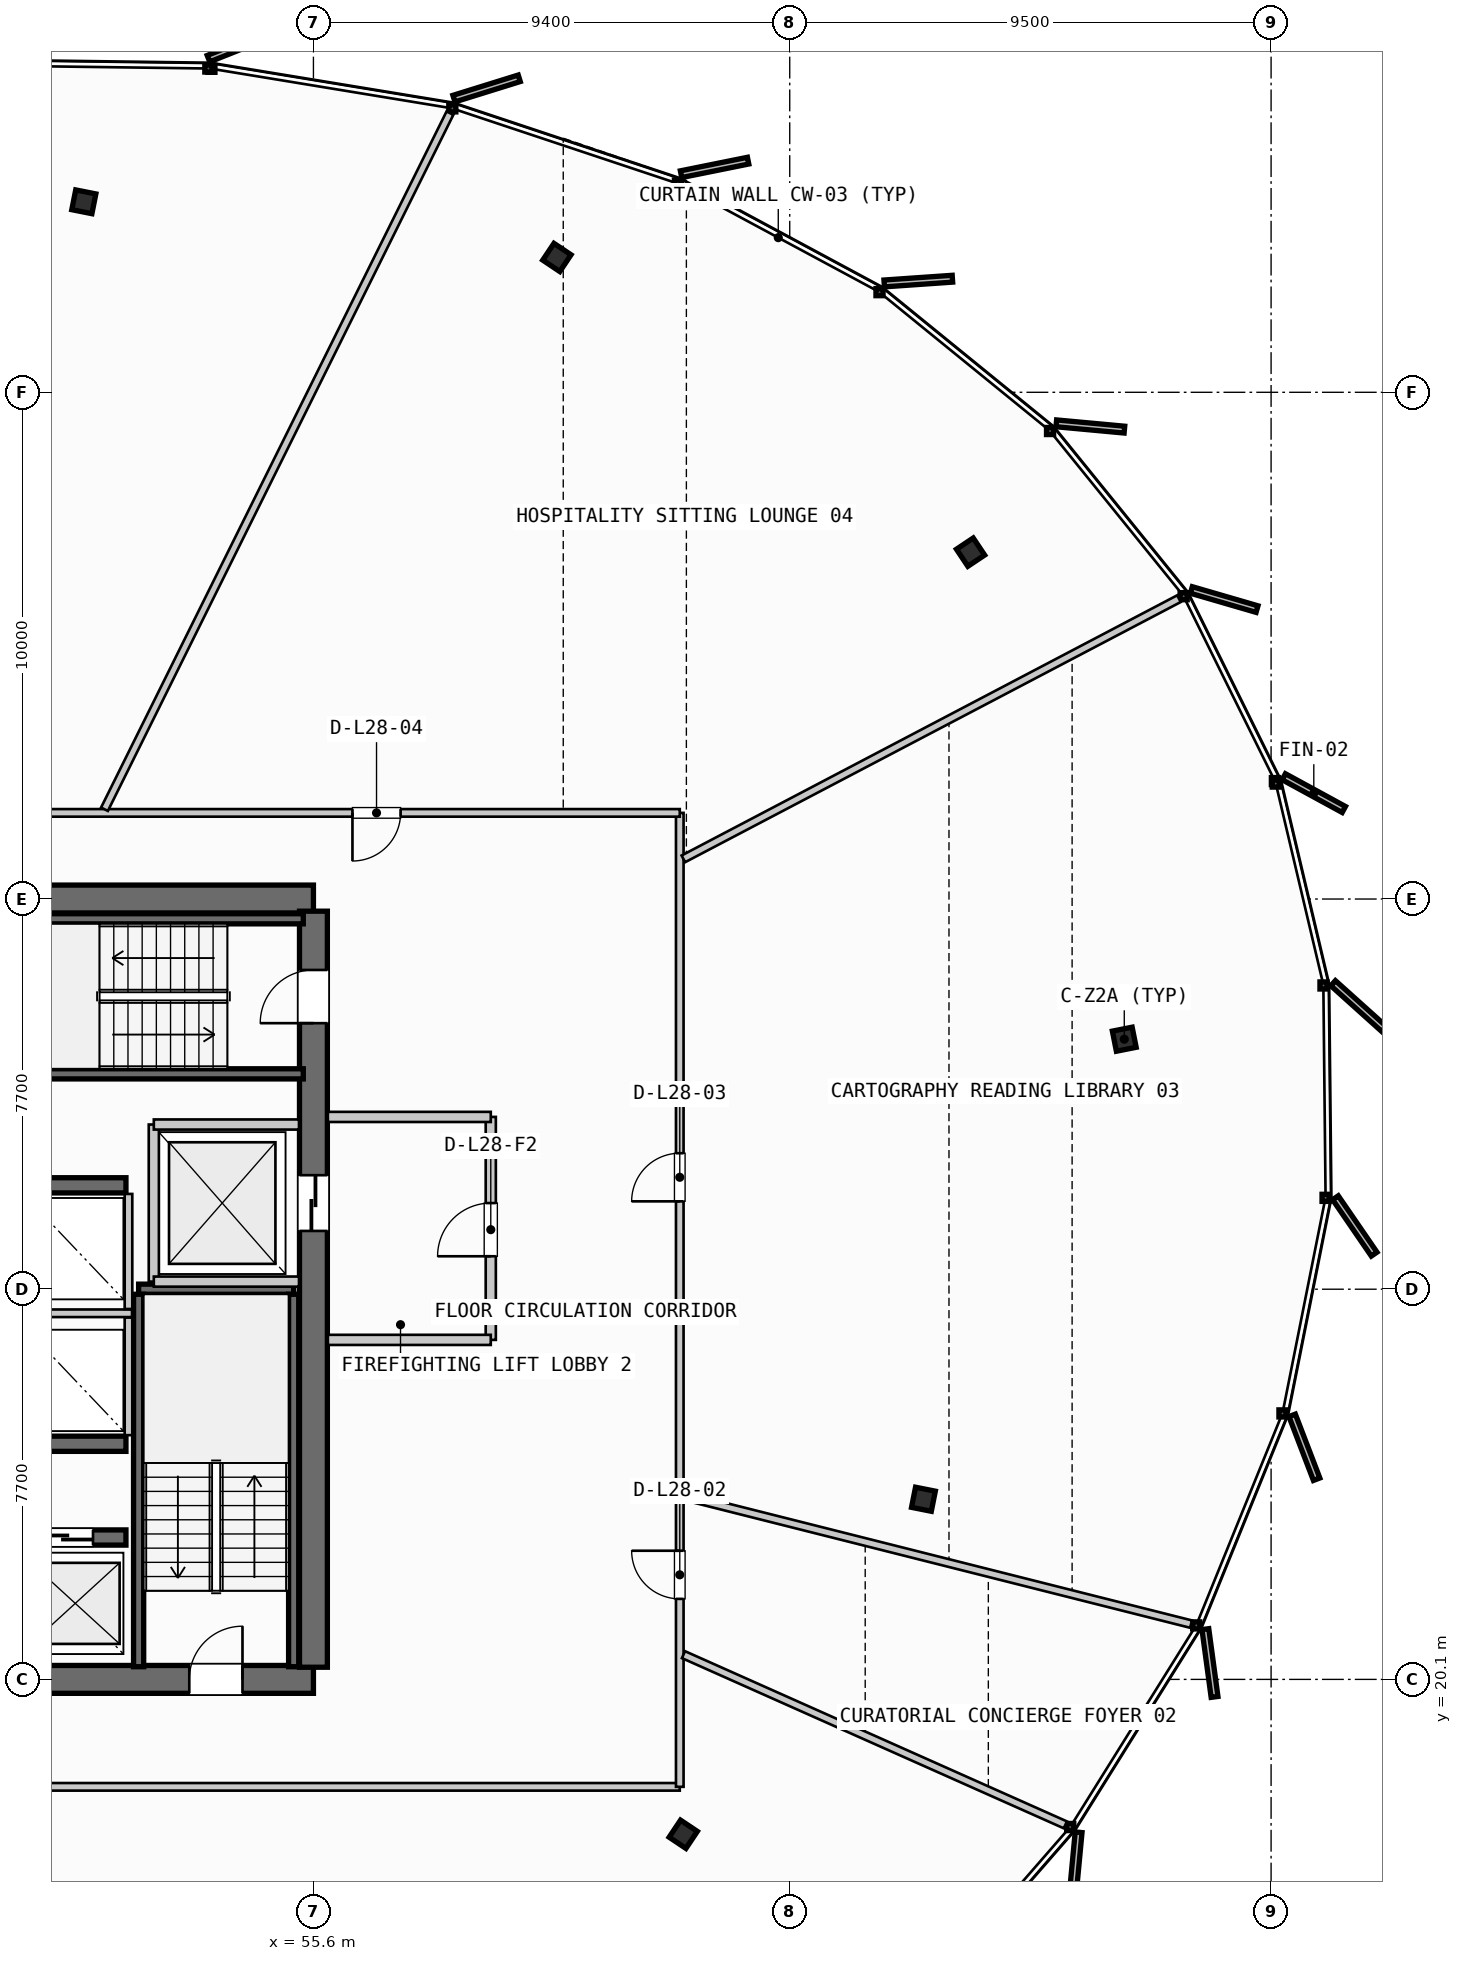
"""IFC4 building model, lengths in metres.
Left out: names, types, materials, properties, quantities, classifications, styles, units other than length and angle.
Written with IfcOpenShell. Run it as: python <this file> out.ifc"""

import sys

from ifc_helpers import new_model, si_unit, direction, frame, frame_2d, origin, origin_2d, place, context, subcontext, project, spatial, rectangle, i_section, extrude, source, transform, mapped, element, fill, save


model = new_model("IFC4")
c1 = context("Model", 3, precision=1e-05, world=origin(), true_north=direction((0.0, 1.0)))
c2 = subcontext(c1, "Body", "Model", "MODEL_VIEW")
j1 = project(units=[si_unit("LENGTHUNIT", "METRE"), si_unit("PLANEANGLEUNIT", "RADIAN")], contexts=[c1])
p1 = place(None, origin())
s1 = spatial("IfcSite", under=j1, at=p1, CompositionType="ELEMENT")
p2 = place(p1, origin())
s2 = spatial("IfcBuilding", under=s1, at=p2, CompositionType="ELEMENT")
p3 = place(p2, frame((0.0, 0.0, 114.4)))
s3 = spatial("IfcBuildingStorey", under=s2, at=p3, CompositionType="ELEMENT", Elevation=114.4)
p4 = place(p3, frame((38.0, 20.1, 0.0), z_axis=(0.0, 0.0, 1.0), x_axis=(1.0, 0.0, 0.0)))
e1 = element("IfcWall", 1, at=p4, inside=s3, PredefinedType="SHEAR", context=c2, shape_type="SweptSolid", body=[
    extrude(rectangle(XDim=17.6, YDim=0.55, at=frame_2d((8.8, 0.0))), origin(), (0.0, 0.0, 1.0), 3.35),
])
p5 = place(p4, frame((1.4, 0.0, 0.0)))
e2 = element("IfcOpeningElement", 2, at=p5, cuts=e1, PredefinedType="OPENING", context=c2, shape_type="SweptSolid", body=[
    extrude(rectangle(XDim=1.05, YDim=2.15, at=frame_2d((0.525, 1.075))), frame((0.0, 0.285, 0.0), z_axis=(0.0, -1.0, 0.0), x_axis=(1.0, 0.0, 0.0)), (0.0, 0.0, 1.0), 0.57),
])
p6 = place(p4, frame((15.15, 0.0, 0.0)))
e3 = element("IfcOpeningElement", 3, at=p6, cuts=e1, PredefinedType="OPENING", context=c2, shape_type="SweptSolid", body=[
    extrude(rectangle(XDim=1.05, YDim=2.15, at=frame_2d((0.525, 1.075))), frame((0.0, 0.285, 0.0), z_axis=(0.0, -1.0, 0.0), x_axis=(1.0, 0.0, 0.0)), (0.0, 0.0, 1.0), 0.57),
])
p7 = place(p3, frame((55.6, 35.5, 0.0), z_axis=(0.0, 0.0, 1.0), x_axis=(-1.0, 0.0, 0.0)))
e4 = element("IfcWall", 4, at=p7, inside=s3, PredefinedType="SHEAR", context=c2, shape_type="SweptSolid", body=[
    extrude(rectangle(XDim=17.6, YDim=0.55, at=frame_2d((8.8, 0.0))), origin(), (0.0, 0.0, 1.0), 3.35),
])
p8 = place(p7, frame((8.05, 0.0, 0.0)))
e5 = element("IfcOpeningElement", 5, at=p8, cuts=e4, PredefinedType="OPENING", context=c2, shape_type="SweptSolid", body=[
    extrude(rectangle(XDim=1.5, YDim=2.2, at=frame_2d((0.75, 1.1))), frame((0.0, 0.285, 0.0), z_axis=(0.0, -1.0, 0.0), x_axis=(1.0, 0.0, 0.0)), (0.0, 0.0, 1.0), 0.57),
])
p9 = place(p7, frame((14.95, 0.0, 0.0)))
e6 = element("IfcOpeningElement", 6, at=p9, cuts=e4, PredefinedType="OPENING", context=c2, shape_type="SweptSolid", body=[
    extrude(rectangle(XDim=1.4, YDim=2.3, at=frame_2d((0.7, 1.15))), frame((0.0, 0.285, 0.0), z_axis=(0.0, -1.0, 0.0), x_axis=(1.0, 0.0, 0.0)), (0.0, 0.0, 1.0), 0.57),
])
p10 = place(p7, frame((12.6, 0.0, 0.0)))
e7 = element("IfcOpeningElement", 7, at=p10, cuts=e4, PredefinedType="OPENING", context=c2, shape_type="SweptSolid", body=[
    extrude(rectangle(XDim=0.95, YDim=2.15, at=frame_2d((0.475, 1.075))), frame((0.0, 0.285, 0.0), z_axis=(0.0, -1.0, 0.0), x_axis=(1.0, 0.0, 0.0)), (0.0, 0.0, 1.0), 0.57),
])
p11 = place(p7, frame((10.45, 0.0, 0.0)))
e8 = element("IfcOpeningElement", 8, at=p11, cuts=e4, PredefinedType="OPENING", context=c2, shape_type="SweptSolid", body=[
    extrude(rectangle(XDim=0.95, YDim=2.15, at=frame_2d((0.475, 1.075))), frame((0.0, 0.285, 0.0), z_axis=(0.0, -1.0, 0.0), x_axis=(1.0, 0.0, 0.0)), (0.0, 0.0, 1.0), 0.57),
])
p12 = place(p3, frame((55.6, 20.34, 0.0), z_axis=(0.0, 0.0, 1.0), x_axis=(0.0, 1.0, 0.0)))
e9 = element("IfcWall", 9, at=p12, inside=s3, PredefinedType="SHEAR", context=c2, shape_type="SweptSolid", body=[
    extrude(rectangle(XDim=14.92, YDim=0.55, at=frame_2d((7.46, 0.0))), origin(), (0.0, 0.0, 1.0), 3.35),
])
p13 = place(p12, frame((12.71, 0.0, 0.0)))
e10 = element("IfcOpeningElement", 10, at=p13, cuts=e9, PredefinedType="OPENING", context=c2, shape_type="SweptSolid", body=[
    extrude(rectangle(XDim=1.05, YDim=2.15, at=frame_2d((0.525, 1.075))), frame((0.0, 0.285, 0.0), z_axis=(0.0, -1.0, 0.0), x_axis=(1.0, 0.0, 0.0)), (0.0, 0.0, 1.0), 0.57),
])
p14 = place(p12, frame((8.61, 0.0, 0.0)))
e11 = element("IfcOpeningElement", 11, at=p14, cuts=e9, PredefinedType="OPENING", context=c2, shape_type="SweptSolid", body=[
    extrude(rectangle(XDim=1.1, YDim=2.2, at=frame_2d((0.55, 1.1))), frame((0.0, 0.285, 0.0), z_axis=(0.0, -1.0, 0.0), x_axis=(1.0, 0.0, 0.0)), (0.0, 0.0, 1.0), 0.57),
])
p15 = place(p3, frame((47.65, 22.9, 0.0), z_axis=(0.0, 0.0, 1.0), x_axis=(1.0, 0.0, 0.0)))
e12 = element("IfcWall", 12, at=p15, inside=s3, PredefinedType="SHEAR", context=c2, shape_type="SweptSolid", body=[
    extrude(rectangle(XDim=4.25, YDim=0.3, at=frame_2d((2.125, 0.0))), origin(), (0.0, 0.0, 1.0), 3.35),
])
p16 = place(p15, frame((0.45, 0.0, 0.0)))
e13 = element("IfcOpeningElement", 13, at=p16, cuts=e12, PredefinedType="OPENING", context=c2, shape_type="SweptSolid", body=[
    extrude(rectangle(XDim=1.1, YDim=2.2, at=frame_2d((0.55, 1.1))), frame((0.0, 0.16, 0.0), z_axis=(0.0, -1.0, 0.0), x_axis=(1.0, 0.0, 0.0)), (0.0, 0.0, 1.0), 0.32),
])
p17 = place(p15, frame((2.5, 0.0, 0.0)))
e14 = element("IfcOpeningElement", 14, at=p17, cuts=e12, PredefinedType="OPENING", context=c2, shape_type="SweptSolid", body=[
    extrude(rectangle(XDim=1.1, YDim=2.2, at=frame_2d((0.55, 1.1))), frame((0.0, 0.16, 0.0), z_axis=(0.0, -1.0, 0.0), x_axis=(1.0, 0.0, 0.0)), (0.0, 0.0, 1.0), 0.32),
])
for number, where, z_axis, x_axis in (
    (15, (47.65, 24.75, 0.0), (0.0, 0.0, 1.0), (1.0, 0.0, 0.0)),
    (16, (47.65, 29.85, 0.0), (0.0, 0.0, 1.0), (1.0, 0.0, 0.0)),
):
    element("IfcWall", number, at=place(p3, frame(where, z_axis=z_axis, x_axis=x_axis)), inside=s3, PredefinedType="SHEAR", context=c2, shape_type="SweptSolid", body=[
        extrude(rectangle(XDim=4.25, YDim=0.3, at=frame_2d((2.125, 0.0))), origin(), (0.0, 0.0, 1.0), 3.35),
    ])
m1 = source(origin(), c2, "Body", "SweptSolid", [
    extrude(i_section(OverallWidth=0.405, OverallDepth=0.398, WebThickness=0.035, FlangeThickness=0.056, FilletRadius=0.015, at=origin_2d()), origin(), (0.0, 0.0, 1.0), 3.35),
])
for number, where, z_axis, x_axis in (
    (17, (71.603, 32.733, 0.0), (0.0, 0.0, 1.0), (0.981, 0.195, 0.0)),
    (18, (68.569, 42.345, 0.0), (0.0, 0.0, 1.0), (0.831, 0.556, 0.0)),
    (19, (60.405, 48.161, 0.0), (0.0, 0.0, 1.0), (0.556, 0.831, 0.0)),
    (20, (51.069, 49.259, 0.0), (0.0, 0.0, 1.0), (0.195, 0.981, 0.0)),
    (21, (62.899, 17.043, 0.0), (0.0, 0.0, 1.0), (0.831, -0.556, 0.0)),
    (22, (67.639, 23.655, 0.0), (0.0, 0.0, 1.0), (0.981, -0.195, 0.0)),
):
    element("IfcColumn", number, at=place(p3, frame(where, z_axis=z_axis, x_axis=x_axis)), inside=s3, PredefinedType="COLUMN", context=c2, shape_type="MappedRepresentation", body=[
        mapped(m1, transform((0.0, 0.0, 0.0), scale=1.0)),
    ])
p18 = place(p3, frame((52.15, 27.8, 0.0), z_axis=(0.0, 0.0, 1.0), x_axis=(1.0, 0.0, 0.0)))
e23 = element("IfcWall", 23, at=p18, inside=s3, PredefinedType="SHEAR", context=c2, shape_type="SweptSolid", body=[
    extrude(rectangle(XDim=3.06, YDim=0.2, at=frame_2d((1.53, 0.0))), origin(), (0.0, 0.0, 1.0), 3.35),
])
for number, where, z_axis, x_axis in (
    (24, (55.21, 27.7, 0.0), (0.0, 0.0, 1.0), (0.0, -1.0, 0.0)),
    (25, (52.15, 20.35, 0.0), (0.0, 0.0, 1.0), (0.0, 1.0, 0.0)),
    (26, (48.05, 35.11, 0.0), (0.0, 0.0, 1.0), (1.0, 0.0, 0.0)),
    (27, (55.4, 32.05, 0.0), (0.0, 0.0, 1.0), (-1.0, 0.0, 0.0)),
):
    element("IfcWall", number, at=place(p3, frame(where, z_axis=z_axis, x_axis=x_axis)), inside=s3, PredefinedType="SHEAR", context=c2, shape_type="SweptSolid", body=[
        extrude(rectangle(XDim=7.35, YDim=0.2, at=frame_2d((3.675, 0.0))), origin(), (0.0, 0.0, 1.0), 3.35),
    ])
p19 = place(p3, frame((52.45, 27.95, 0.0), z_axis=(0.0, 0.0, 1.0), x_axis=(0.0, 1.0, 0.0)))
e28 = element("IfcWall", 28, at=p19, inside=s3, PredefinedType="PARTITIONING", context=c2, shape_type="SweptSolid", body=[
    extrude(rectangle(XDim=3.1, YDim=0.2, at=frame_2d((1.55, 0.0))), origin(), (0.0, 0.0, 1.0), 2.28),
])
for number, where, z_axis, x_axis in (
    (29, (52.45, 27.95, 0.0), (0.0, 0.0, 1.0), (1.0, 0.0, 0.0)),
    (30, (52.45, 31.05, 0.0), (0.0, 0.0, 1.0), (1.0, 0.0, 0.0)),
):
    element("IfcWall", number, at=place(p3, frame(where, z_axis=z_axis, x_axis=x_axis)), inside=s3, PredefinedType="PARTITIONING", context=c2, shape_type="SweptSolid", body=[
        extrude(rectangle(XDim=2.865, YDim=0.2, at=frame_2d((1.433, 0.0))), origin(), (0.0, 0.0, 1.0), 2.28),
    ])
p20 = place(p3, frame((59.1, 26.8, 0.0), z_axis=(0.0, 0.0, 1.0), x_axis=(0.0, 1.0, 0.0)))
e31 = element("IfcWall", 31, at=p20, inside=s3, PredefinedType="PARTITIONING", context=c2, shape_type="SweptSolid", body=[
    extrude(rectangle(XDim=4.4, YDim=0.2, at=frame_2d((2.2, 0.0))), origin(), (0.0, 0.0, 1.0), 2.28),
])
p21 = place(p20, frame((1.65, 0.0, 0.0)))
e32 = element("IfcOpeningElement", 32, at=p21, cuts=e31, PredefinedType="OPENING", context=c2, shape_type="SweptSolid", body=[
    extrude(rectangle(XDim=1.05, YDim=2.15, at=frame_2d((0.525, 1.075))), frame((0.0, 0.11, 0.0), z_axis=(0.0, -1.0, 0.0), x_axis=(1.0, 0.0, 0.0)), (0.0, 0.0, 1.0), 0.22),
])
for number, where, z_axis, x_axis in (
    (33, (55.885, 26.8, 0.0), (0.0, 0.0, 1.0), (1.0, 0.0, 0.0)),
    (34, (55.885, 31.2, 0.0), (0.0, 0.0, 1.0), (1.0, 0.0, 0.0)),
):
    element("IfcWall", number, at=place(p3, frame(where, z_axis=z_axis, x_axis=x_axis)), inside=s3, PredefinedType="PARTITIONING", context=c2, shape_type="SweptSolid", body=[
        extrude(rectangle(XDim=3.215, YDim=0.2, at=frame_2d((1.607, 0.0))), origin(), (0.0, 0.0, 1.0), 2.28),
    ])
p22 = place(p3, frame((47.7, 27.325, 0.0), z_axis=(0.0, 0.0, 1.0), x_axis=(1.0, 0.0, 0.0)))
e35 = element("IfcWall", 35, at=p22, inside=s3, PredefinedType="PARTITIONING", context=c2, shape_type="SweptSolid", body=[
    extrude(rectangle(XDim=4.32, YDim=0.15, at=frame_2d((2.16, 0.0))), origin(), (0.0, 0.0, 1.0), 2.28),
])
p23 = place(p3, frame((51.95, 24.92, 0.0), z_axis=(0.0, 0.0, 1.0), x_axis=(0.0, 1.0, 0.0)))
e36 = element("IfcWall", 36, at=p23, inside=s3, PredefinedType="PARTITIONING", context=c2, shape_type="SweptSolid", body=[
    extrude(rectangle(XDim=2.32, YDim=0.15, at=frame_2d((1.16, 0.0))), origin(), (0.0, 0.0, 1.0), 2.28),
])
p24 = place(p3, frame((51.95, 27.41, 0.0), z_axis=(0.0, 0.0, 1.0), x_axis=(0.0, 1.0, 0.0)))
e37 = element("IfcWall", 37, at=p24, inside=s3, PredefinedType="PARTITIONING", context=c2, shape_type="SweptSolid", body=[
    extrude(rectangle(XDim=2.27, YDim=0.15, at=frame_2d((1.135, 0.0))), origin(), (0.0, 0.0, 1.0), 2.28),
])
p25 = place(p3, frame((32.33, 17.98, 0.0), z_axis=(0.0, 0.0, 1.0), x_axis=(1.0, 0.0, 0.0)))
e38 = element("IfcWall", 38, at=p25, inside=s3, PredefinedType="PARTITIONING", context=c2, shape_type="SweptSolid", body=[
    extrude(rectangle(XDim=30.5, YDim=0.15, at=frame_2d((15.25, 0.0))), origin(), (0.0, 0.0, 1.0), 2.28),
])
p26 = place(p25, frame((14.968, 0.0, 0.0)))
e39 = element("IfcOpeningElement", 39, at=p26, cuts=e38, PredefinedType="OPENING", context=c2, shape_type="SweptSolid", body=[
    extrude(rectangle(XDim=0.95, YDim=2.15, at=frame_2d((0.475, 1.075))), frame((0.0, 0.085, 0.0), z_axis=(0.0, -1.0, 0.0), x_axis=(1.0, 0.0, 0.0)), (0.0, 0.0, 1.0), 0.17),
])
p27 = place(p3, frame((62.83, 17.98, 0.0), z_axis=(0.0, 0.0, 1.0), x_axis=(0.0, 1.0, 0.0)))
e40 = element("IfcWall", 40, at=p27, inside=s3, PredefinedType="PARTITIONING", context=c2, shape_type="SweptSolid", body=[
    extrude(rectangle(XDim=19.22, YDim=0.15, at=frame_2d((9.61, 0.0))), origin(), (0.0, 0.0, 1.0), 2.28),
])
p28 = place(p27, frame((3.709, 0.0, 0.0)))
e41 = element("IfcOpeningElement", 41, at=p28, cuts=e40, PredefinedType="OPENING", context=c2, shape_type="SweptSolid", body=[
    extrude(rectangle(XDim=0.95, YDim=2.15, at=frame_2d((0.475, 1.075))), frame((0.0, 0.085, 0.0), z_axis=(0.0, -1.0, 0.0), x_axis=(1.0, 0.0, 0.0)), (0.0, 0.0, 1.0), 0.17),
])
p29 = place(p27, frame((11.554, 0.0, 0.0)))
e42 = element("IfcOpeningElement", 42, at=p29, cuts=e40, PredefinedType="OPENING", context=c2, shape_type="SweptSolid", body=[
    extrude(rectangle(XDim=0.95, YDim=2.15, at=frame_2d((0.475, 1.075))), frame((0.0, 0.085, 0.0), z_axis=(0.0, -1.0, 0.0), x_axis=(1.0, 0.0, 0.0)), (0.0, 0.0, 1.0), 0.17),
])
p30 = place(p3, frame((62.83, 37.2, 0.0), z_axis=(0.0, 0.0, 1.0), x_axis=(-1.0, 0.0, 0.0)))
e43 = element("IfcWall", 43, at=p30, inside=s3, PredefinedType="PARTITIONING", context=c2, shape_type="SweptSolid", body=[
    extrude(rectangle(XDim=30.5, YDim=0.15, at=frame_2d((15.25, 0.0))), origin(), (0.0, 0.0, 1.0), 2.28),
])
p31 = place(p30, frame((5.51, 0.0, 0.0)))
e44 = element("IfcOpeningElement", 44, at=p31, cuts=e43, PredefinedType="OPENING", context=c2, shape_type="SweptSolid", body=[
    extrude(rectangle(XDim=0.95, YDim=2.15, at=frame_2d((0.475, 1.075))), frame((0.0, 0.085, 0.0), z_axis=(0.0, -1.0, 0.0), x_axis=(1.0, 0.0, 0.0)), (0.0, 0.0, 1.0), 0.17),
])
p32 = place(p30, frame((20.164, 0.0, 0.0)))
e45 = element("IfcOpeningElement", 45, at=p32, cuts=e43, PredefinedType="OPENING", context=c2, shape_type="SweptSolid", body=[
    extrude(rectangle(XDim=0.95, YDim=2.15, at=frame_2d((0.475, 1.075))), frame((0.0, 0.085, 0.0), z_axis=(0.0, -1.0, 0.0), x_axis=(1.0, 0.0, 0.0)), (0.0, 0.0, 1.0), 0.17),
])
p33 = place(p3, frame((62.903, 20.588, 0.0), z_axis=(0.0, 0.0, 1.0), x_axis=(0.91339868134, -0.407066148096, 0.0)))
e46 = element("IfcWall", 46, at=p33, inside=s3, PredefinedType="PARTITIONING", context=c2, shape_type="SweptSolid", body=[
    extrude(rectangle(XDim=8.251, YDim=0.15, at=frame_2d((4.126, 0.0))), origin(), (0.0, 0.0, 1.0), 2.28),
])
p34 = place(p3, frame((62.908, 23.715, 0.0), z_axis=(0.0, 0.0, 1.0), x_axis=(0.969678992697, -0.244382182496, 0.0)))
e47 = element("IfcWall", 47, at=p34, inside=s3, PredefinedType="PARTITIONING", context=c2, shape_type="SweptSolid", body=[
    extrude(rectangle(XDim=10.326, YDim=0.15, at=frame_2d((5.163, 0.0))), origin(), (0.0, 0.0, 1.0), 2.28),
])
p35 = place(p3, frame((62.901, 36.293, 0.0), z_axis=(0.0, 0.0, 1.0), x_axis=(0.885416775878, 0.464797948568, 0.0)))
e48 = element("IfcWall", 48, at=p35, inside=s3, PredefinedType="PARTITIONING", context=c2, shape_type="SweptSolid", body=[
    extrude(rectangle(XDim=11.047, YDim=0.15, at=frame_2d((5.523, 0.0))), origin(), (0.0, 0.0, 1.0), 2.28),
])
p36 = place(p3, frame((51.476, 37.272, 0.0), z_axis=(0.0, 0.0, 1.0), x_axis=(0.444600978951, 0.895728736569, 0.0)))
e49 = element("IfcWall", 49, at=p36, inside=s3, PredefinedType="PARTITIONING", context=c2, shape_type="SweptSolid", body=[
    extrude(rectangle(XDim=15.336, YDim=0.15, at=frame_2d((7.668, 0.0))), origin(), (0.0, 0.0, 1.0), 2.28),
])
m2 = source(origin(), c2, "Body", "SweptSolid", [
    extrude(rectangle(XDim=1.05, YDim=2.15, at=frame_2d((0.525, 1.075))), frame((0.0, 0.025, 0.0), z_axis=(0.0, -1.0, 0.0), x_axis=(1.0, 0.0, 0.0)), (0.0, 0.0, 1.0), 0.05),
])
p37 = place(p6, origin())
e50 = element("IfcDoor", 50, at=p37, inside=s3, OperationType="SINGLE_SWING_RIGHT", PredefinedType="DOOR", context=c2, shape_type="MappedRepresentation", body=[
    mapped(m2, transform((0.0, 0.0, 0.0), scale=1.0)),
])
fill(e3, e50)
p38 = place(p13, origin())
e51 = element("IfcDoor", 51, at=p38, inside=s3, OperationType="SINGLE_SWING_LEFT", PredefinedType="DOOR", context=c2, shape_type="MappedRepresentation", body=[
    mapped(m2, transform((0.0, 0.0, 0.0), scale=1.0)),
])
fill(e10, e51)
m3 = source(origin(), c2, "Body", "SweptSolid", [
    extrude(rectangle(XDim=1.1, YDim=2.2, at=frame_2d((0.55, 1.1))), frame((0.0, 0.025, 0.0), z_axis=(0.0, -1.0, 0.0), x_axis=(1.0, 0.0, 0.0)), (0.0, 0.0, 1.0), 0.05),
])
p39 = place(p14, origin())
e52 = element("IfcDoor", 52, at=p39, inside=s3, OperationType="SLIDING_TO_RIGHT", PredefinedType="DOOR", context=c2, shape_type="MappedRepresentation", body=[
    mapped(m3, transform((0.0, 0.0, 0.0), scale=1.0)),
])
fill(e11, e52)
p40 = place(p17, origin())
e53 = element("IfcDoor", 53, at=p40, inside=s3, OperationType="SLIDING_TO_LEFT", PredefinedType="DOOR", context=c2, shape_type="MappedRepresentation", body=[
    mapped(m3, transform((0.0, 0.0, 0.0), scale=1.0)),
])
fill(e14, e53)
p41 = place(p21, origin())
e54 = element("IfcDoor", 54, at=p41, inside=s3, OperationType="SINGLE_SWING_LEFT", PredefinedType="DOOR", context=c2, shape_type="MappedRepresentation", body=[
    mapped(m2, transform((0.0, 0.0, 0.0), scale=1.0)),
])
fill(e32, e54)
m4 = source(origin(), c2, "Body", "SweptSolid", [
    extrude(rectangle(XDim=0.95, YDim=2.15, at=frame_2d((0.475, 1.075))), frame((0.0, 0.025, 0.0), z_axis=(0.0, -1.0, 0.0), x_axis=(1.0, 0.0, 0.0)), (0.0, 0.0, 1.0), 0.05),
])
p42 = place(p28, origin())
e55 = element("IfcDoor", 55, at=p42, inside=s3, OperationType="SINGLE_SWING_RIGHT", PredefinedType="DOOR", context=c2, shape_type="MappedRepresentation", body=[
    mapped(m4, transform((0.0, 0.0, 0.0), scale=1.0)),
])
fill(e41, e55)
p43 = place(p29, origin())
e56 = element("IfcDoor", 56, at=p43, inside=s3, OperationType="SINGLE_SWING_LEFT", PredefinedType="DOOR", context=c2, shape_type="MappedRepresentation", body=[
    mapped(m4, transform((0.0, 0.0, 0.0), scale=1.0)),
])
fill(e42, e56)
p44 = place(p31, origin())
e57 = element("IfcDoor", 57, at=p44, inside=s3, OperationType="SINGLE_SWING_RIGHT", PredefinedType="DOOR", context=c2, shape_type="MappedRepresentation", body=[
    mapped(m4, transform((0.0, 0.0, 0.0), scale=1.0)),
])
fill(e44, e57)
save(model, sys.argv[1])
